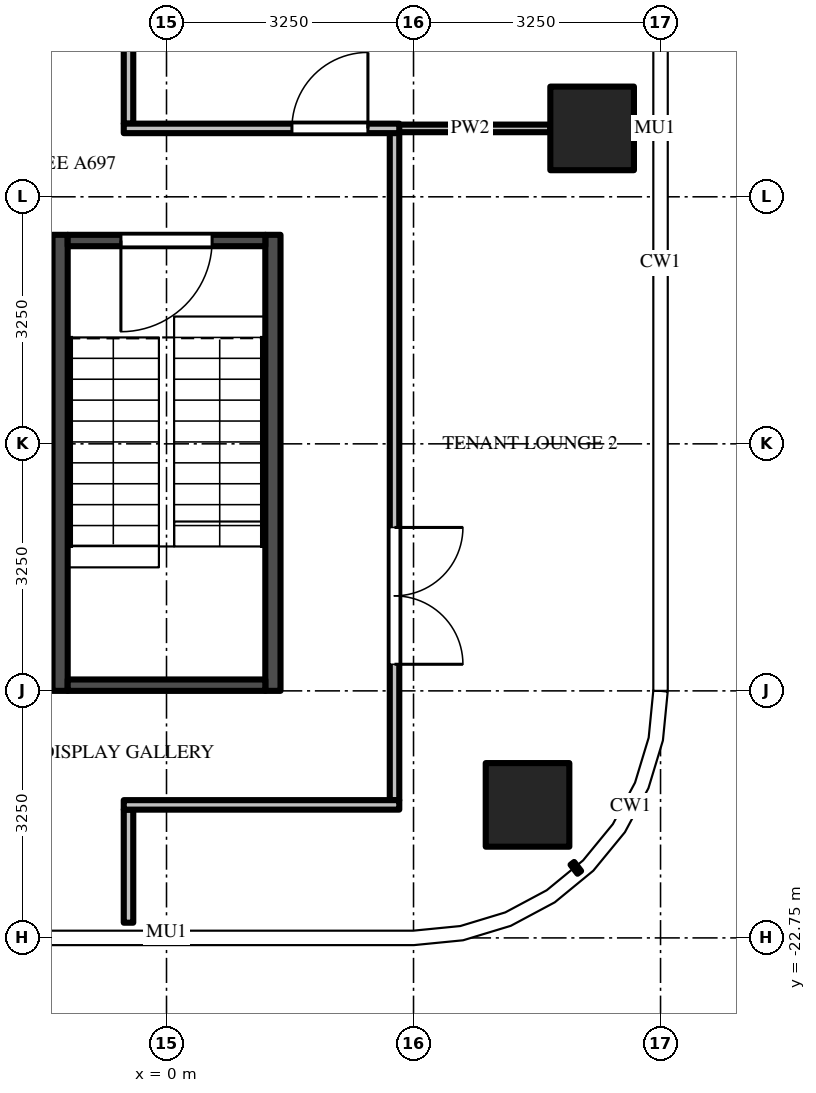
"""IFC4 building model, lengths in metres.
Left out: names, types, materials, properties, quantities, classifications, styles, units other than length and angle.
Written with IfcOpenShell. Run it as: python <this file> out.ifc"""

import sys

from ifc_helpers import new_model, si_unit, direction, frame, frame_2d, origin, origin_2d, place, context, subcontext, project, spatial, rectangle, extrude, source, transform, mapped, element, fill, save


model = new_model("IFC4")
c1 = context("Model", 3, precision=1e-05, world=origin(), true_north=direction((0.0, 1.0)))
c2 = subcontext(c1, "Body", "Model", "MODEL_VIEW")
j1 = project(units=[si_unit("LENGTHUNIT", "METRE"), si_unit("PLANEANGLEUNIT", "RADIAN")], contexts=[c1])
p1 = place(None, origin())
s1 = spatial("IfcSite", under=j1, at=p1, CompositionType="ELEMENT")
p2 = place(p1, origin())
s2 = spatial("IfcBuilding", under=s1, at=p2, CompositionType="ELEMENT")
p3 = place(p2, frame((0.0, 0.0, 255.8)))
s3 = spatial("IfcBuildingStorey", under=s2, at=p3, CompositionType="ELEMENT", Elevation=255.8)
m1 = source(origin(), c2, "Body", "SweptSolid", [
    extrude(rectangle(XDim=1.1, YDim=1.1, at=origin_2d()), origin(), (0.0, 0.0, 1.0), 3.9),
])
for number, where, z_axis, x_axis in (
    (1, (5.6, -12.1, 0.0), (0.0, 0.0, 1.0), (1.0, 0.0, 0.0)),
    (2, (4.75, -21.0, 0.0), (0.0, 0.0, 1.0), (1.0, 0.0, 0.0)),
):
    element("IfcColumn", number, at=place(p3, frame(where, z_axis=z_axis, x_axis=x_axis)), inside=s3, PredefinedType="COLUMN", context=c2, shape_type="MappedRepresentation", body=[
        mapped(m1, transform((0.0, 0.0, 0.0))),
    ])
m2 = source(origin(), c2, "Body", "SweptSolid", [
    extrude(rectangle(XDim=6.0, YDim=0.2, at=frame_2d((3.0, 0.0))), origin(), (0.0, 0.0, 1.0), 3.7),
])
for number, where, z_axis, x_axis in (
    (3, (1.4, -13.5, 0.0), (0.0, 0.0, 1.0), (0.0, -1.0, 0.0)),
    (4, (-1.4, -13.5, 0.0), (0.0, 0.0, 1.0), (0.0, -1.0, 0.0)),
):
    element("IfcWall", number, at=place(p3, frame(where, z_axis=z_axis, x_axis=x_axis)), inside=s3, PredefinedType="SHEAR", context=c2, shape_type="MappedRepresentation", body=[
        mapped(m2, transform((0.0, 0.0, 0.0))),
    ])
m3 = source(origin(), c2, "Body", "SweptSolid", [
    extrude(rectangle(XDim=2.6, YDim=0.15, at=frame_2d((1.3, 0.0))), origin(), (0.0, 0.0, 1.0), 3.7),
])
p4 = place(p3, frame((1.3, -13.575, 0.0), z_axis=(0.0, 0.0, 1.0), x_axis=(-1.0, 0.0, 0.0)))
e5 = element("IfcWall", 5, at=p4, inside=s3, PredefinedType="SHEAR", context=c2, shape_type="MappedRepresentation", body=[
    mapped(m3, transform((0.0, 0.0, 0.0))),
])
m4 = source(origin(), c2, "Body", "SweptSolid", [
    extrude(rectangle(XDim=1.2, YDim=2.1, at=frame_2d((0.6, 1.05))), frame((0.0, 0.085, 0.0), z_axis=(0.0, -1.0, 0.0), x_axis=(1.0, 0.0, 0.0)), (0.0, 0.0, 1.0), 0.17),
])
p5 = place(p4, frame((0.7, 0.0, 0.0)))
e6 = element("IfcOpeningElement", 6, at=p5, cuts=e5, PredefinedType="OPENING", context=c2, shape_type="MappedRepresentation", body=[
    mapped(m4, transform((0.0, 0.0, 0.0))),
])
p6 = place(p3, frame((1.3, -19.425, 0.0), z_axis=(0.0, 0.0, 1.0), x_axis=(-1.0, 0.0, 0.0)))
e7 = element("IfcWall", 7, at=p6, inside=s3, PredefinedType="SHEAR", context=c2, shape_type="MappedRepresentation", body=[
    mapped(m3, transform((0.0, 0.0, 0.0))),
])
m5 = source(origin(), c2, "Body", "SweptSolid", [
    extrude(rectangle(XDim=1.488, YDim=0.125, at=frame_2d((0.744, 0.0))), origin(), (0.0, 0.0, 1.0), 2.78),
])
p7 = place(p3, frame((-0.5, -21.062, 0.0), z_axis=(0.0, 0.0, 1.0), x_axis=(0.0, -1.0, 0.0)))
e8 = element("IfcWall", 8, at=p7, inside=s3, PredefinedType="PARTITIONING", context=c2, shape_type="MappedRepresentation", body=[
    mapped(m5, transform((0.0, 0.0, 0.0))),
])
m6 = source(origin(), c2, "Body", "SweptSolid", [
    extrude(rectangle(XDim=5.475, YDim=0.125, at=frame_2d((2.738, 0.0))), origin(), (0.0, 0.0, 1.0), 2.997),
])
p8 = place(p3, frame((-0.5, -6.562, 0.0), z_axis=(0.0, 0.0, 1.0), x_axis=(0.0, -1.0, 0.0)))
e9 = element("IfcWall", 9, at=p8, inside=s3, PredefinedType="PARTITIONING", context=c2, shape_type="MappedRepresentation", body=[
    mapped(m6, transform((0.0, 0.0, 0.0))),
])
m7 = source(origin(), c2, "Body", "SweptSolid", [
    extrude(rectangle(XDim=1.0, YDim=2.1, at=frame_2d((0.5, 1.05))), frame((0.0, 0.073, 0.0), z_axis=(0.0, -1.0, 0.0), x_axis=(1.0, 0.0, 0.0)), (0.0, 0.0, 1.0), 0.145),
])
p9 = place(p8, frame((1.837, 0.0, 0.0)))
e10 = element("IfcOpeningElement", 10, at=p9, cuts=e9, PredefinedType="OPENING", context=c2, shape_type="MappedRepresentation", body=[
    mapped(m7, transform((0.0, 0.0, 0.0))),
])
m8 = source(origin(), c2, "Body", "SweptSolid", [
    extrude(rectangle(XDim=8.788, YDim=0.125, at=frame_2d((4.394, 0.0))), origin(), (0.0, 0.0, 1.0), 2.78),
])
p10 = place(p3, frame((3.0, -12.15, 0.0), z_axis=(0.0, 0.0, 1.0), x_axis=(0.0, -1.0, 0.0)))
e11 = element("IfcWall", 11, at=p10, inside=s3, PredefinedType="PARTITIONING", context=c2, shape_type="MappedRepresentation", body=[
    mapped(m8, transform((0.0, 0.0, 0.0))),
])
m9 = source(origin(), c2, "Body", "SweptSolid", [
    extrude(rectangle(XDim=1.8, YDim=2.1, at=frame_2d((0.9, 1.05))), frame((0.0, 0.073, 0.0), z_axis=(0.0, -1.0, 0.0), x_axis=(1.0, 0.0, 0.0)), (0.0, 0.0, 1.0), 0.145),
])
p11 = place(p10, frame((5.2, 0.0, 0.0)))
e12 = element("IfcOpeningElement", 12, at=p11, cuts=e11, PredefinedType="OPENING", context=c2, shape_type="MappedRepresentation", body=[
    mapped(m9, transform((0.0, 0.0, 0.0))),
])
m10 = source(origin(), c2, "Body", "SweptSolid", [
    extrude(rectangle(XDim=3.625, YDim=0.125, at=frame_2d((1.812, 0.0))), origin(), (0.0, 0.0, 1.0), 2.78),
])
p12 = place(p3, frame((3.062, -21.0, 0.0), z_axis=(0.0, 0.0, 1.0), x_axis=(-1.0, 0.0, 0.0)))
e13 = element("IfcWall", 13, at=p12, inside=s3, PredefinedType="PARTITIONING", context=c2, shape_type="MappedRepresentation", body=[
    mapped(m10, transform((0.0, 0.0, 0.0))),
])
m11 = source(origin(), c2, "Body", "SweptSolid", [
    extrude(rectangle(XDim=2.113, YDim=0.1, at=frame_2d((1.056, 0.0))), origin(), (0.0, 0.0, 1.0), 2.997),
])
p13 = place(p3, frame((2.938, -12.1, 0.0), z_axis=(0.0, 0.0, 1.0), x_axis=(1.0, 0.0, 0.0)))
e14 = element("IfcWall", 14, at=p13, inside=s3, PredefinedType="PARTITIONING", context=c2, shape_type="MappedRepresentation", body=[
    mapped(m11, transform((0.0, 0.0, 0.0))),
])
m12 = source(origin(), c2, "Body", "SweptSolid", [
    extrude(rectangle(XDim=3.625, YDim=0.125, at=frame_2d((1.812, 0.0))), origin(), (0.0, 0.0, 1.0), 2.997),
])
p14 = place(p3, frame((-0.562, -12.1, 0.0), z_axis=(0.0, 0.0, 1.0), x_axis=(1.0, 0.0, 0.0)))
e15 = element("IfcWall", 15, at=p14, inside=s3, PredefinedType="PARTITIONING", context=c2, shape_type="MappedRepresentation", body=[
    mapped(m12, transform((0.0, 0.0, 0.0))),
])
p15 = place(p14, frame((2.212, 0.0, 0.0)))
e16 = element("IfcOpeningElement", 16, at=p15, cuts=e15, PredefinedType="OPENING", context=c2, shape_type="MappedRepresentation", body=[
    mapped(m7, transform((0.0, 0.0, 0.0))),
])
m13 = source(origin(), c2, "Body", "SweptSolid", [
    extrude(rectangle(XDim=1.2, YDim=2.1, at=frame_2d((0.6, 1.05))), frame((0.0, 0.025, 0.0), z_axis=(0.0, -1.0, 0.0), x_axis=(1.0, 0.0, 0.0)), (0.0, 0.0, 1.0), 0.05),
])
p16 = place(p5, origin())
e17 = element("IfcDoor", 17, at=p16, inside=s3, OperationType="SINGLE_SWING_RIGHT", PredefinedType="DOOR", context=c2, shape_type="MappedRepresentation", body=[
    mapped(m13, transform((0.0, 0.0, 0.0))),
])
fill(e6, e17)
m14 = source(origin(), c2, "Body", "SweptSolid", [
    extrude(rectangle(XDim=1.8, YDim=2.1, at=frame_2d((0.9, 1.05))), frame((0.0, 0.025, 0.0), z_axis=(0.0, -1.0, 0.0), x_axis=(1.0, 0.0, 0.0)), (0.0, 0.0, 1.0), 0.05),
])
p17 = place(p11, origin())
e18 = element("IfcDoor", 18, at=p17, inside=s3, OperationType="DOUBLE_DOOR_SINGLE_SWING", PredefinedType="DOOR", context=c2, shape_type="MappedRepresentation", body=[
    mapped(m14, transform((0.0, 0.0, 0.0))),
])
fill(e12, e18)
m15 = source(origin(), c2, "Body", "SweptSolid", [
    extrude(rectangle(XDim=1.0, YDim=2.1, at=frame_2d((0.5, 1.05))), frame((0.0, 0.025, 0.0), z_axis=(0.0, -1.0, 0.0), x_axis=(1.0, 0.0, 0.0)), (0.0, 0.0, 1.0), 0.05),
])
p18 = place(p15, origin())
e19 = element("IfcDoor", 19, at=p18, inside=s3, OperationType="SINGLE_SWING_RIGHT", PredefinedType="DOOR", context=c2, shape_type="MappedRepresentation", body=[
    mapped(m15, transform((0.0, 0.0, 0.0))),
])
fill(e16, e19)
save(model, sys.argv[1])
